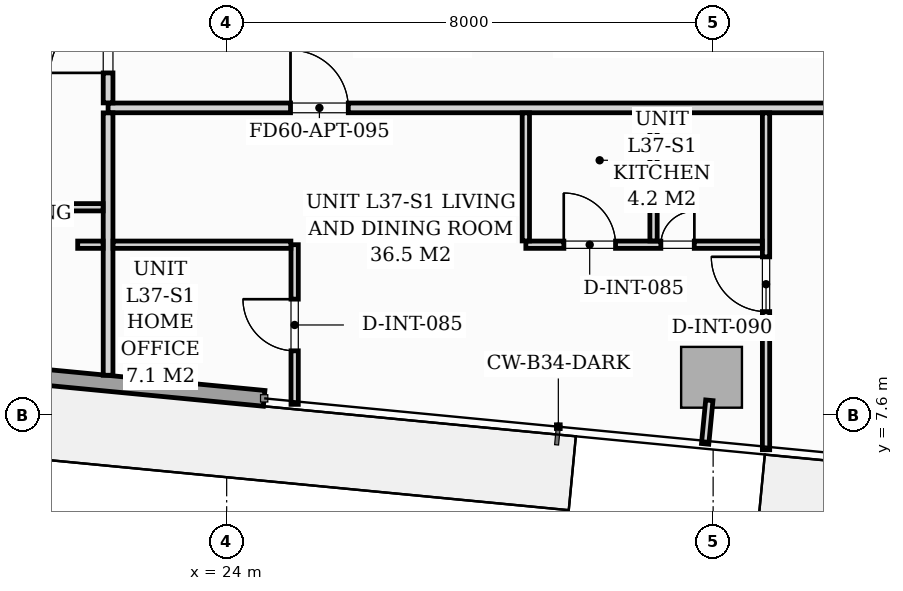
"""IFC4 building model, lengths in metres.
Left out: names, types, materials, properties, quantities, classifications, styles, units other than length and angle.
Written with IfcOpenShell. Run it as: python <this file> out.ifc"""

import sys

from ifc_helpers import new_model, si_unit, direction, frame, frame_2d, origin, origin_2d, place, context, subcontext, project, spatial, rectangle, extrude, source, transform, mapped, element, fill, save


model = new_model("IFC4")
c1 = context("Model", 3, precision=1e-05, world=origin(), true_north=direction((0.0, 1.0)))
c2 = subcontext(c1, "Body", "Model", "MODEL_VIEW")
j1 = project(units=[si_unit("LENGTHUNIT", "METRE"), si_unit("PLANEANGLEUNIT", "RADIAN")], contexts=[c1])
p1 = place(None, origin())
s1 = spatial("IfcSite", under=j1, at=p1, CompositionType="ELEMENT")
p2 = place(p1, origin())
s2 = spatial("IfcBuilding", under=s1, at=p2, CompositionType="ELEMENT")
p3 = place(p2, frame((0.0, 0.0, 131.0)))
s3 = spatial("IfcBuildingStorey", under=s2, at=p3, CompositionType="ELEMENT", Elevation=131.0)
m1 = source(origin(), c2, "Body", "SweptSolid", [
    extrude(rectangle(XDim=1.0, YDim=1.0, at=origin_2d()), origin(), (0.0, 0.0, 1.0), 3.196),
])
p4 = place(p3, frame((31.974, 8.22, 0.002), z_axis=(0.0, 0.0, 1.0), x_axis=(0.995396198367, -0.09584575252, 0.0)))
e1 = element("IfcColumn", 1, at=p4, inside=s3, PredefinedType="COLUMN", context=c2, shape_type="MappedRepresentation", body=[
    mapped(m1, transform((0.0, 0.0, 0.0), scale=1.0)),
])
p5 = place(p3, frame((24.617, 7.873, 0.0), z_axis=(0.0, 0.0, 1.0), x_axis=(-0.995395976631, 0.095848055311, 0.0)))
e2 = element("IfcWall", 2, at=p5, inside=s3, PredefinedType="STANDARD", context=c2, shape_type="SweptSolid", body=[
    extrude(rectangle(XDim=17.01, YDim=0.26, at=frame_2d((8.505, 0.0))), origin(), (0.0, 0.0, 1.0), 2.94),
])
p6 = place(p5, frame((6.65, 0.0, 0.0)))
e3 = element("IfcOpeningElement", 3, at=p6, cuts=e2, PredefinedType="OPENING", context=c2, shape_type="SweptSolid", body=[
    extrude(rectangle(XDim=1.8, YDim=2.06, at=frame_2d((0.9, 1.03))), frame((0.0, 0.14, 0.0), z_axis=(0.0, -1.0, 0.0), x_axis=(1.0, 0.0, 0.0)), (0.0, 0.0, 1.0), 0.28),
])
p7 = place(p5, frame((9.25, 0.0, 0.65)))
e4 = element("IfcOpeningElement", 4, at=p7, cuts=e2, PredefinedType="OPENING", context=c2, shape_type="SweptSolid", body=[
    extrude(rectangle(XDim=1.6, YDim=1.5, at=frame_2d((0.8, 0.75))), frame((0.0, 0.14, 0.0), z_axis=(0.0, -1.0, 0.0), x_axis=(1.0, 0.0, 0.0)), (0.0, 0.0, 1.0), 0.28),
])
p8 = place(p3, frame((22.05, 12.65, 0.0), z_axis=(0.0, 0.0, 1.0), x_axis=(1.0, 0.0, 0.0)))
e5 = element("IfcWall", 5, at=p8, inside=s3, PredefinedType="PARTITIONING", context=c2, shape_type="SweptSolid", body=[
    extrude(rectangle(XDim=23.83, YDim=0.16, at=frame_2d((11.915, 0.0))), origin(), (0.0, 0.0, 1.0), 2.94),
])
p9 = place(p8, frame((3.0, 0.0, 0.0)))
e6 = element("IfcOpeningElement", 6, at=p9, cuts=e5, PredefinedType="OPENING", context=c2, shape_type="SweptSolid", body=[
    extrude(rectangle(XDim=0.95, YDim=2.06, at=frame_2d((0.475, 1.03))), frame((0.0, 0.09, 0.0), z_axis=(0.0, -1.0, 0.0), x_axis=(1.0, 0.0, 0.0)), (0.0, 0.0, 1.0), 0.18),
])
p10 = place(p8, frame((15.485, 0.0, 0.0)))
e7 = element("IfcOpeningElement", 7, at=p10, cuts=e5, PredefinedType="OPENING", context=c2, shape_type="SweptSolid", body=[
    extrude(rectangle(XDim=0.95, YDim=2.06, at=frame_2d((0.475, 1.03))), frame((0.0, 0.09, 0.0), z_axis=(0.0, -1.0, 0.0), x_axis=(1.0, 0.0, 0.0)), (0.0, 0.0, 1.0), 0.18),
])
p11 = place(p3, frame((22.05, 8.253, 0.0), z_axis=(0.0, 0.0, 1.0), x_axis=(0.0, 1.0, 0.0)))
e8 = element("IfcWall", 8, at=p11, inside=s3, PredefinedType="PARTITIONING", context=c2, shape_type="SweptSolid", body=[
    extrude(rectangle(XDim=4.315, YDim=0.16, at=frame_2d((2.157, 0.0))), origin(), (0.0, 0.0, 1.0), 2.94),
])
p12 = place(p3, frame((22.05, 12.732, 0.0), z_axis=(0.0, 0.0, 1.0), x_axis=(0.0, 1.0, 0.0)))
e9 = element("IfcWall", 9, at=p12, inside=s3, PredefinedType="PARTITIONING", context=c2, shape_type="SweptSolid", body=[
    extrude(rectangle(XDim=14.685, YDim=0.16, at=frame_2d((7.343, 0.0))), origin(), (0.0, 0.0, 1.0), 2.94),
])
p13 = place(p12, frame((0.493, 0.0, 0.0)))
e10 = element("IfcOpeningElement", 10, at=p13, cuts=e9, PredefinedType="OPENING", context=c2, shape_type="SweptSolid", body=[
    extrude(rectangle(XDim=0.95, YDim=2.06, at=frame_2d((0.475, 1.03))), frame((0.0, 0.09, 0.0), z_axis=(0.0, -1.0, 0.0), x_axis=(1.0, 0.0, 0.0)), (0.0, 0.0, 1.0), 0.18),
])
p14 = place(p12, frame((5.313, 0.0, 0.0)))
e11 = element("IfcOpeningElement", 11, at=p14, cuts=e9, PredefinedType="OPENING", context=c2, shape_type="SweptSolid", body=[
    extrude(rectangle(XDim=0.85, YDim=2.0, at=frame_2d((0.425, 1.0))), frame((0.0, 0.09, 0.0), z_axis=(0.0, -1.0, 0.0), x_axis=(1.0, 0.0, 0.0)), (0.0, 0.0, 1.0), 0.18),
])
p15 = place(p3, frame((32.87, 7.028, 0.0), z_axis=(0.0, 0.0, 1.0), x_axis=(0.0, 1.0, 0.0)))
e12 = element("IfcWall", 12, at=p15, inside=s3, PredefinedType="PARTITIONING", context=c2, shape_type="SweptSolid", body=[
    extrude(rectangle(XDim=5.54, YDim=0.12, at=frame_2d((2.77, 0.0))), origin(), (0.0, 0.0, 1.0), 2.94),
])
p16 = place(p15, frame((2.272, 0.0, 0.0)))
e13 = element("IfcOpeningElement", 13, at=p16, cuts=e12, PredefinedType="OPENING", context=c2, shape_type="SweptSolid", body=[
    extrude(rectangle(XDim=0.9, YDim=2.05, at=frame_2d((0.45, 1.025))), frame((0.0, 0.07, 0.0), z_axis=(0.0, -1.0, 0.0), x_axis=(1.0, 0.0, 0.0)), (0.0, 0.0, 1.0), 0.14),
])
p17 = place(p3, frame((28.92, 10.4, 0.0), z_axis=(0.0, 0.0, 1.0), x_axis=(1.0, 0.0, 0.0)))
e14 = element("IfcWall", 14, at=p17, inside=s3, PredefinedType="PARTITIONING", context=c2, shape_type="SweptSolid", body=[
    extrude(rectangle(XDim=3.888, YDim=0.12, at=frame_2d((1.944, 0.0))), origin(), (0.0, 0.0, 1.0), 2.94),
])
p18 = place(p17, frame((0.625, 0.0, 0.0)))
e15 = element("IfcOpeningElement", 15, at=p18, cuts=e14, PredefinedType="OPENING", context=c2, shape_type="SweptSolid", body=[
    extrude(rectangle(XDim=0.85, YDim=2.05, at=frame_2d((0.425, 1.025))), frame((0.0, 0.07, 0.0), z_axis=(0.0, -1.0, 0.0), x_axis=(1.0, 0.0, 0.0)), (0.0, 0.0, 1.0), 0.14),
])
p19 = place(p17, frame((2.22, 0.0, 0.0)))
e16 = element("IfcOpeningElement", 16, at=p19, cuts=e14, PredefinedType="OPENING", context=c2, shape_type="SweptSolid", body=[
    extrude(rectangle(XDim=0.55, YDim=2.0, at=frame_2d((0.275, 1.0))), frame((0.0, 0.07, 0.0), z_axis=(0.0, -1.0, 0.0), x_axis=(1.0, 0.0, 0.0)), (0.0, 0.0, 1.0), 0.14),
])
for number, where, z_axis, x_axis in (
    (17, (31.02, 10.462, 0.0), (0.0, 0.0, 1.0), (0.0, 1.0, 0.0)),
    (18, (28.92, 10.462, 0.0), (0.0, 0.0, 1.0), (0.0, 1.0, 0.0)),
):
    element("IfcWall", number, at=place(p3, frame(where, z_axis=z_axis, x_axis=x_axis)), inside=s3, PredefinedType="PARTITIONING", context=c2, shape_type="SweptSolid", body=[
        extrude(rectangle(XDim=2.106, YDim=0.12, at=frame_2d((1.053, 0.0))), origin(), (0.0, 0.0, 1.0), 2.94),
    ])
p20 = place(p3, frame((25.118, 7.775, 0.0), z_axis=(0.0, 0.0, 1.0), x_axis=(0.0, 1.0, 0.0)))
e19 = element("IfcWall", 19, at=p20, inside=s3, PredefinedType="PARTITIONING", context=c2, shape_type="SweptSolid", body=[
    extrude(rectangle(XDim=2.625, YDim=0.12, at=frame_2d((1.312, 0.0))), origin(), (0.0, 0.0, 1.0), 2.94),
])
p21 = place(p20, frame((0.88, 0.0, 0.0)))
e20 = element("IfcOpeningElement", 20, at=p21, cuts=e19, PredefinedType="OPENING", context=c2, shape_type="SweptSolid", body=[
    extrude(rectangle(XDim=0.85, YDim=2.05, at=frame_2d((0.425, 1.025))), frame((0.0, 0.07, 0.0), z_axis=(0.0, -1.0, 0.0), x_axis=(1.0, 0.0, 0.0)), (0.0, 0.0, 1.0), 0.14),
])
p22 = place(p3, frame((21.55, 10.4, 0.0), z_axis=(0.0, 0.0, 1.0), x_axis=(1.0, 0.0, 0.0)))
e21 = element("IfcWall", 21, at=p22, inside=s3, PredefinedType="PARTITIONING", context=c2, shape_type="SweptSolid", body=[
    extrude(rectangle(XDim=0.418, YDim=0.12, at=frame_2d((0.209, 0.0))), origin(), (0.0, 0.0, 1.0), 2.94),
])
p23 = place(p3, frame((22.132, 10.4, 0.0), z_axis=(0.0, 0.0, 1.0), x_axis=(1.0, 0.0, 0.0)))
e22 = element("IfcWall", 22, at=p23, inside=s3, PredefinedType="PARTITIONING", context=c2, shape_type="SweptSolid", body=[
    extrude(rectangle(XDim=2.924, YDim=0.12, at=frame_2d((1.462, 0.0))), origin(), (0.0, 0.0, 1.0), 2.94),
])
p24 = place(p3, frame((10.151, 11.016, 0.0), z_axis=(0.0, 0.0, 1.0), x_axis=(1.0, 0.0, 0.0)))
e23 = element("IfcWall", 23, at=p24, inside=s3, PredefinedType="PARTITIONING", context=c2, shape_type="SweptSolid", body=[
    extrude(rectangle(XDim=11.817, YDim=0.12, at=frame_2d((5.909, 0.0))), origin(), (0.0, 0.0, 1.0), 2.94),
])
p25 = place(p24, frame((5.483, 0.0, 0.0)))
e24 = element("IfcOpeningElement", 24, at=p25, cuts=e23, PredefinedType="OPENING", context=c2, shape_type="SweptSolid", body=[
    extrude(rectangle(XDim=0.85, YDim=2.05, at=frame_2d((0.425, 1.025))), frame((0.0, 0.07, 0.0), z_axis=(0.0, -1.0, 0.0), x_axis=(1.0, 0.0, 0.0)), (0.0, 0.0, 1.0), 0.14),
])
p26 = place(p3, frame((31.938, 7.841, 0.0), z_axis=(0.0, 0.0, 1.0), x_axis=(-0.095977354523, -0.995383517755, 0.0)))
e25 = element("IfcWall", 25, at=p26, inside=s3, PredefinedType="PARTITIONING", context=c2, shape_type="SweptSolid", body=[
    extrude(rectangle(XDim=0.72, YDim=0.12, at=frame_2d((0.36, 0.0))), origin(), (0.0, 0.0, 1.0), 2.94),
])
m2 = source(origin(), c2, "Body", "SweptSolid", [
    extrude(rectangle(XDim=0.85, YDim=2.05, at=frame_2d((0.425, 1.025))), frame((0.0, 0.025, 0.0), z_axis=(0.0, -1.0, 0.0), x_axis=(1.0, 0.0, 0.0)), (0.0, 0.0, 1.0), 0.05),
])
p27 = place(p21, origin())
e26 = element("IfcDoor", 26, at=p27, inside=s3, OperationType="SINGLE_SWING_RIGHT", PredefinedType="DOOR", context=c2, shape_type="MappedRepresentation", body=[
    mapped(m2, transform((0.0, 0.0, 0.0), scale=1.0)),
])
fill(e20, e26)
m3 = source(origin(), c2, "Body", "SweptSolid", [
    extrude(rectangle(XDim=0.95, YDim=2.06, at=frame_2d((0.475, 1.03))), frame((0.0, 0.025, 0.0), z_axis=(0.0, -1.0, 0.0), x_axis=(1.0, 0.0, 0.0)), (0.0, 0.0, 1.0), 0.05),
])
p28 = place(p9, origin())
e27 = element("IfcDoor", 27, at=p28, inside=s3, OperationType="SINGLE_SWING_LEFT", PredefinedType="DOOR", context=c2, shape_type="MappedRepresentation", body=[
    mapped(m3, transform((0.0, 0.0, 0.0), scale=1.0)),
])
fill(e6, e27)
m4 = source(origin(), c2, "Body", "SweptSolid", [
    extrude(rectangle(XDim=0.9, YDim=2.05, at=frame_2d((0.45, 1.025))), frame((0.0, 0.025, 0.0), z_axis=(0.0, -1.0, 0.0), x_axis=(1.0, 0.0, 0.0)), (0.0, 0.0, 1.0), 0.05),
])
p29 = place(p16, origin())
e28 = element("IfcDoor", 28, at=p29, inside=s3, OperationType="SINGLE_SWING_RIGHT", PredefinedType="DOOR", context=c2, shape_type="MappedRepresentation", body=[
    mapped(m4, transform((0.0, 0.0, 0.0), scale=1.0)),
])
fill(e13, e28)
p30 = place(p18, origin())
e29 = element("IfcDoor", 29, at=p30, inside=s3, OperationType="SINGLE_SWING_LEFT", PredefinedType="DOOR", context=c2, shape_type="MappedRepresentation", body=[
    mapped(m2, transform((0.0, 0.0, 0.0), scale=1.0)),
])
fill(e15, e29)
m5 = source(origin(), c2, "Body", "SweptSolid", [
    extrude(rectangle(XDim=0.55, YDim=2.0, at=frame_2d((0.275, 1.0))), frame((0.0, 0.025, 0.0), z_axis=(0.0, -1.0, 0.0), x_axis=(1.0, 0.0, 0.0)), (0.0, 0.0, 1.0), 0.05),
])
p31 = place(p19, origin())
e30 = element("IfcDoor", 30, at=p31, inside=s3, OperationType="SINGLE_SWING_RIGHT", PredefinedType="DOOR", context=c2, shape_type="MappedRepresentation", body=[
    mapped(m5, transform((0.0, 0.0, 0.0), scale=1.0)),
])
fill(e16, e30)
p32 = place(p13, origin())
e31 = element("IfcDoor", 31, at=p32, inside=s3, OperationType="SINGLE_SWING_LEFT", PredefinedType="DOOR", context=c2, shape_type="MappedRepresentation", body=[
    mapped(m3, transform((0.0, 0.0, 0.0), scale=1.0)),
])
fill(e10, e31)
save(model, sys.argv[1])
